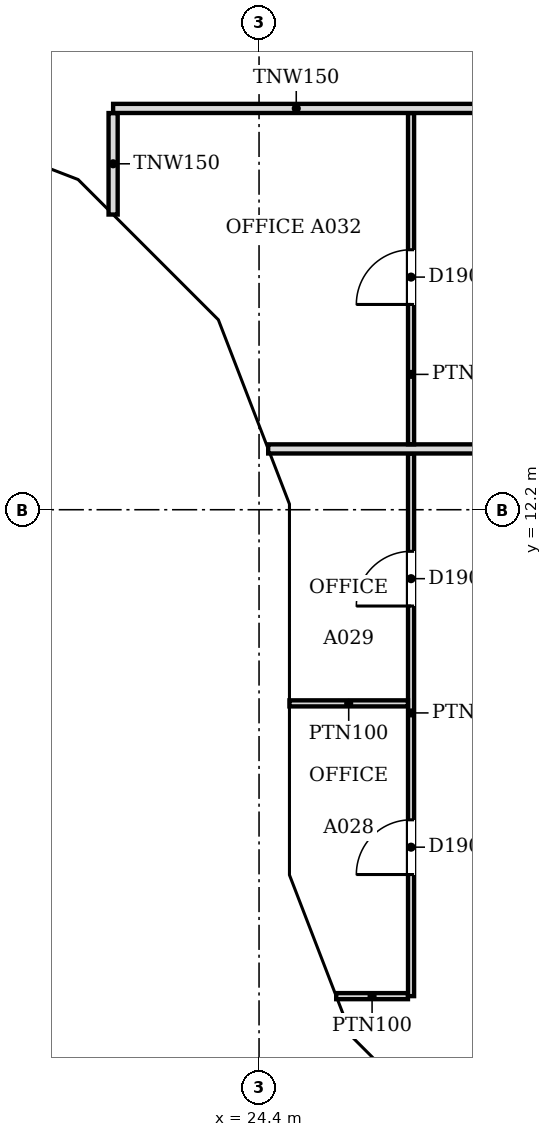
"""IFC4 building model, lengths in metres.
Left out: names, types, materials, properties, quantities, classifications, styles, units other than length and angle.
Written with IfcOpenShell. Run it as: python <this file> out.ifc"""

import sys

from ifc_helpers import new_model, si_unit, direction, frame, frame_2d, origin, place, context, subcontext, project, spatial, polyline, rectangle, outline, extrude, faceted_brep, source, transform, mapped, element, fill, save


model = new_model("IFC4")
c1 = context("Model", 3, precision=1e-05, world=origin(), true_north=direction((0.0, 1.0)))
c2 = subcontext(c1, "Body", "Model", "MODEL_VIEW")
j1 = project(units=[si_unit("LENGTHUNIT", "METRE"), si_unit("PLANEANGLEUNIT", "RADIAN")], contexts=[c1])
p1 = place(None, origin())
s1 = spatial("IfcSite", under=j1, at=p1, CompositionType="ELEMENT")
p2 = place(p1, origin())
s2 = spatial("IfcBuilding", under=s1, at=p2, CompositionType="ELEMENT")
p3 = place(p2, frame((0.0, 0.0, 155.4)))
s3 = spatial("IfcBuildingStorey", under=s2, at=p3, CompositionType="ELEMENT", Elevation=155.4)
m1 = source(origin(), c2, "Body", "Brep", [
    faceted_brep([(3.143, -0.25, 0.064), (0.093, -0.25, 3.744), (0.093, -0.25, 0.0), (3.143, -0.25, 0.0), (0.0, 0.25, 3.743), (0.047, 0.25, 3.8), (3.196, 0.25, 0.0), (0.0, 0.25, 0.0), (0.047, 0.0, 3.8), (3.196, -0.0, 0.0)], [[[0, 1, 2, 3]], [[4, 5, 6, 7]], [[6, 5, 8, 1, 0, 9]], [[5, 4, 8]], [[7, 6, 9, 3, 2]], [[7, 2, 1, 8, 4]], [[3, 9, 0]]]),
])
p4 = place(p3, frame((18.303, 18.567, 0.0), z_axis=(0.0, 0.0, 1.0), x_axis=(0.932978940178, -0.359930961693, 0.0)))
e1 = element("IfcWall", 1, at=p4, inside=s3, PredefinedType="SOLIDWALL", context=c2, shape_type="MappedRepresentation", body=[
    mapped(m1, transform((0.0, 0.0, 0.0), scale=1.0)),
])
m2 = source(origin(), c2, "Body", "SweptSolid", [
    extrude(outline(polyline([(2.664, 0.25), (0.247, 3.167), (0.247, 0.25), (2.664, 0.25)])), frame((0.0, 0.26, 0.0), z_axis=(0.0, -1.0, 0.0), x_axis=(1.0, 0.0, 0.0)), (0.0, 0.0, 1.0), 0.52),
])
p5 = place(p4, origin())
e2 = element("IfcOpeningElement", 2, at=p5, cuts=e1, PredefinedType="OPENING", context=c2, shape_type="MappedRepresentation", body=[
    mapped(m2, transform((0.0, 0.0, 0.0), scale=1.0)),
])
m3 = source(origin(), c2, "Body", "Brep", [
    faceted_brep([(3.103, -0.25, 3.736), (0.053, -0.25, 0.064), (0.053, -0.25, 0.0), (3.103, -0.25, 0.0), (0.0, 0.25, 0.0), (3.156, 0.25, 3.8), (3.209, 0.25, 3.736), (3.209, 0.25, 0.0), (3.156, -0.0, 3.8), (0.0, 0.0, 0.0)], [[[0, 1, 2, 3]], [[4, 5, 6, 7]], [[6, 5, 8]], [[5, 4, 9, 1, 0, 8]], [[4, 7, 3, 2, 9]], [[9, 2, 1]], [[3, 7, 6, 8, 0]]]),
])
p6 = place(p3, frame((21.285, 17.417, 0.0), z_axis=(0.0, 0.0, 1.0), x_axis=(0.707106781187, -0.707106781187, 0.0)))
e3 = element("IfcWall", 3, at=p6, inside=s3, PredefinedType="SOLIDWALL", context=c2, shape_type="MappedRepresentation", body=[
    mapped(m3, transform((0.0, 0.0, 0.0), scale=1.0)),
])
m4 = source(origin(), c2, "Body", "SweptSolid", [
    extrude(outline(polyline([(2.956, 3.168), (0.533, 0.25), (2.956, 0.25), (2.956, 3.168)])), frame((0.0, 0.26, 0.0), z_axis=(0.0, -1.0, 0.0), x_axis=(1.0, 0.0, 0.0)), (0.0, 0.0, 1.0), 0.52),
])
p7 = place(p6, origin())
e4 = element("IfcOpeningElement", 4, at=p7, cuts=e3, PredefinedType="OPENING", context=c2, shape_type="MappedRepresentation", body=[
    mapped(m4, transform((0.0, 0.0, 0.0), scale=1.0)),
])
m5 = source(origin(), c2, "Body", "Brep", [
    faceted_brep([(3.156, -0.25, 0.056), (0.106, -0.25, 3.736), (0.106, -0.25, 0.0), (3.156, -0.25, 0.0), (0.0, 0.25, 3.736), (0.053, 0.25, 3.8), (3.202, 0.25, 0.0), (0.0, 0.25, 0.0), (0.053, 0.0, 3.8), (3.202, -0.0, 0.0)], [[[0, 1, 2, 3]], [[4, 5, 6, 7]], [[6, 5, 8, 1, 0, 9]], [[5, 4, 8]], [[7, 6, 9, 3, 2]], [[7, 2, 1, 8, 4]], [[3, 9, 0]]]),
])
p8 = place(p3, frame((23.497, 15.234, 0.0), z_axis=(0.0, 0.0, 1.0), x_axis=(0.359913782069, -0.932985567668, 0.0)))
e5 = element("IfcWall", 5, at=p8, inside=s3, PredefinedType="SOLIDWALL", context=c2, shape_type="MappedRepresentation", body=[
    mapped(m5, transform((0.0, 0.0, 0.0), scale=1.0)),
])
m6 = source(origin(), c2, "Body", "SweptSolid", [
    extrude(outline(polyline([(2.671, 0.25), (0.253, 3.167), (0.253, 0.25), (2.671, 0.25)])), frame((0.0, 0.26, 0.0), z_axis=(0.0, -1.0, 0.0), x_axis=(1.0, 0.0, 0.0)), (0.0, 0.0, 1.0), 0.52),
])
p9 = place(p8, origin())
e6 = element("IfcOpeningElement", 6, at=p9, cuts=e5, PredefinedType="OPENING", context=c2, shape_type="MappedRepresentation", body=[
    mapped(m6, transform((0.0, 0.0, 0.0), scale=1.0)),
])
m7 = source(origin(), c2, "Body", "Brep", [
    faceted_brep([(6.1, -0.25, 0.0), (3.096, -0.25, 3.8), (0.047, -0.25, 0.057), (0.047, -0.25, 0.0), (0.0, 0.25, 0.0), (3.096, 0.25, 3.8), (6.053, 0.25, 0.059), (6.053, 0.25, 0.0), (6.1, -0.0, 0.0), (0.0, 0.0, 0.0)], [[[0, 1, 2, 3]], [[4, 5, 6, 7]], [[6, 5, 1, 0, 8]], [[5, 4, 9, 2, 1]], [[4, 7, 8, 0, 3, 9]], [[9, 3, 2]], [[8, 7, 6]]]),
])
p10 = place(p3, frame((24.65, 12.247, 0.0), z_axis=(0.0, 0.0, 1.0), x_axis=(0.0, -1.0, 0.0)))
e7 = element("IfcWall", 7, at=p10, inside=s3, PredefinedType="SOLIDWALL", context=c2, shape_type="MappedRepresentation", body=[
    mapped(m7, transform((0.0, 0.0, 0.0), scale=1.0)),
])
m8 = source(origin(), c2, "Body", "SweptSolid", [
    extrude(outline(polyline([(5.584, 0.25), (3.094, 3.401), (0.526, 0.25), (5.584, 0.25)])), frame((0.0, 0.26, 0.0), z_axis=(0.0, -1.0, 0.0), x_axis=(1.0, 0.0, 0.0)), (0.0, 0.0, 1.0), 0.52),
])
p11 = place(p10, origin())
e8 = element("IfcOpeningElement", 8, at=p11, cuts=e7, PredefinedType="OPENING", context=c2, shape_type="MappedRepresentation", body=[
    mapped(m8, transform((0.0, 0.0, 0.0), scale=1.0)),
])
m9 = source(origin(), c2, "Body", "Brep", [
    faceted_brep([(3.003, -0.25, 3.732), (2.95, -0.25, 3.8), (0.0, -0.25, 0.0), (3.003, -0.25, 0.0), (0.047, 0.25, 0.06), (2.898, 0.25, 3.732), (2.898, 0.25, 0.0), (0.047, 0.25, 0.0), (2.95, 0.0, 3.8), (0.0, 0.0, 0.0)], [[[0, 1, 2, 3]], [[4, 5, 6, 7]], [[8, 1, 0]], [[5, 4, 9, 2, 1, 8]], [[7, 6, 3, 2, 9]], [[7, 9, 4]], [[3, 6, 5, 8, 0]]]),
])
p12 = place(p3, frame((24.65, 6.146, 0.0), z_axis=(0.0, 0.0, 1.0), x_axis=(0.359953949349, -0.932970071518, 0.0)))
e9 = element("IfcWall", 9, at=p12, inside=s3, PredefinedType="SOLIDWALL", context=c2, shape_type="MappedRepresentation", body=[
    mapped(m9, transform((0.0, 0.0, 0.0), scale=1.0)),
])
m10 = source(origin(), c2, "Body", "SweptSolid", [
    extrude(outline(polyline([(2.75, 3.135), (0.511, 0.25), (2.75, 0.25), (2.75, 3.135)])), frame((0.0, 0.26, 0.0), z_axis=(0.0, -1.0, 0.0), x_axis=(1.0, 0.0, 0.0)), (0.0, 0.0, 1.0), 0.52),
])
p13 = place(p12, origin())
e10 = element("IfcOpeningElement", 10, at=p13, cuts=e9, PredefinedType="OPENING", context=c2, shape_type="MappedRepresentation", body=[
    mapped(m10, transform((0.0, 0.0, 0.0), scale=1.0)),
])
m11 = source(origin(), c2, "Body", "Brep", [
    faceted_brep([(2.997, -0.25, 0.0), (0.053, -0.25, 3.8), (0.0, -0.25, 3.732), (0.0, -0.25, 0.0), (0.106, 0.25, 3.732), (2.944, 0.25, 0.068), (2.944, 0.25, 0.0), (0.106, 0.25, 0.0), (0.053, 0.0, 3.8), (2.997, 0.0, 0.0)], [[[0, 1, 2, 3]], [[4, 5, 6, 7]], [[5, 4, 8, 1, 0, 9]], [[2, 1, 8]], [[7, 6, 9, 0, 3]], [[7, 3, 2, 8, 4]], [[9, 6, 5]]]),
])
p14 = place(p3, frame((25.675, 3.431, 0.0), z_axis=(0.0, 0.0, 1.0), x_axis=(0.707106781187, -0.707106781187, 0.0)))
e11 = element("IfcWall", 11, at=p14, inside=s3, PredefinedType="SOLIDWALL", context=c2, shape_type="MappedRepresentation", body=[
    mapped(m11, transform((0.0, 0.0, 0.0), scale=1.0)),
])
m12 = source(origin(), c2, "Body", "SweptSolid", [
    extrude(outline(polyline([(2.487, 0.25), (0.253, 3.134), (0.253, 0.25), (2.487, 0.25)])), frame((0.0, 0.26, 0.0), z_axis=(0.0, -1.0, 0.0), x_axis=(1.0, 0.0, 0.0)), (0.0, 0.0, 1.0), 0.52),
])
p15 = place(p14, origin())
e12 = element("IfcOpeningElement", 12, at=p15, cuts=e11, PredefinedType="OPENING", context=c2, shape_type="MappedRepresentation", body=[
    mapped(m12, transform((0.0, 0.0, 0.0), scale=1.0)),
])
p16 = place(p2, frame((0.0, 0.0, 159.2)))
s4 = spatial("IfcBuildingStorey", under=s2, at=p16, CompositionType="ELEMENT", Elevation=159.2)
m13 = source(origin(), c2, "Body", "Brep", [
    faceted_brep([(3.096, -0.25, 7.536), (0.047, -0.25, 3.856), (0.047, -0.25, 3.744), (3.096, -0.25, 0.064), (0.0, 0.25, 3.8), (3.149, 0.25, 7.6), (3.202, 0.25, 7.536), (3.202, 0.25, 0.064), (3.149, 0.25, 0.0), (3.149, -0.0, 0.0), (3.149, -0.0, 7.6), (0.0, 0.0, 3.8)], [[[0, 1, 2, 3]], [[4, 5, 6, 7, 8]], [[8, 7, 9]], [[6, 5, 10]], [[5, 4, 11, 1, 0, 10]], [[4, 8, 9, 3, 2, 11]], [[11, 2, 1]], [[3, 9, 7, 6, 10, 0]]]),
])
p17 = place(p16, frame((18.346, 18.55, -3.8), z_axis=(0.0, 0.0, 1.0), x_axis=(0.932985567668, -0.359913782069, 0.0)))
e13 = element("IfcWall", 13, at=p17, inside=s4, PredefinedType="SOLIDWALL", context=c2, shape_type="MappedRepresentation", body=[
    mapped(m13, transform((0.0, 0.0, 0.0), scale=1.0)),
])
m14 = source(origin(), c2, "Body", "SweptSolid", [
    extrude(outline(polyline([(2.949, 6.967), (0.325, 3.8), (2.949, 0.633), (2.949, 6.967)])), frame((0.0, 0.26, 0.0), z_axis=(0.0, -1.0, 0.0), x_axis=(1.0, 0.0, 0.0)), (0.0, 0.0, 1.0), 0.52),
])
p18 = place(p17, origin())
e14 = element("IfcOpeningElement", 14, at=p18, cuts=e13, PredefinedType="OPENING", context=c2, shape_type="MappedRepresentation", body=[
    mapped(m14, transform((0.0, 0.0, 0.0), scale=1.0)),
])
m15 = source(origin(), c2, "Body", "Brep", [
    faceted_brep([(0.106, -0.25, 0.064), (3.156, -0.25, 3.736), (3.156, -0.25, 3.864), (0.106, -0.25, 7.536), (0.0, 0.25, 7.536), (0.053, 0.25, 7.6), (3.209, 0.25, 3.8), (0.053, 0.25, 0.0), (0.0, 0.25, 0.064), (3.209, -0.0, 3.8), (0.053, 0.0, 0.0), (0.053, 0.0, 7.6)], [[[0, 1, 2, 3]], [[4, 5, 6, 7, 8]], [[7, 6, 9, 1, 0, 10]], [[6, 5, 11, 3, 2, 9]], [[5, 4, 11]], [[8, 7, 10]], [[8, 10, 0, 3, 11, 4]], [[1, 9, 2]]]),
])
p19 = place(p16, frame((21.248, 17.454, -3.8), z_axis=(0.0, 0.0, 1.0), x_axis=(0.707106781187, -0.707106781187, 0.0)))
e15 = element("IfcWall", 15, at=p19, inside=s4, PredefinedType="SOLIDWALL", context=c2, shape_type="MappedRepresentation", body=[
    mapped(m15, transform((0.0, 0.0, 0.0), scale=1.0)),
])
m16 = source(origin(), c2, "Body", "SweptSolid", [
    extrude(outline(polyline([(0.253, 0.632), (2.884, 3.8), (0.253, 6.968), (0.253, 0.632)])), frame((0.0, 0.26, 0.0), z_axis=(0.0, -1.0, 0.0), x_axis=(1.0, 0.0, 0.0)), (0.0, 0.0, 1.0), 0.52),
])
p20 = place(p19, origin())
e16 = element("IfcOpeningElement", 16, at=p20, cuts=e15, PredefinedType="OPENING", context=c2, shape_type="MappedRepresentation", body=[
    mapped(m16, transform((0.0, 0.0, 0.0), scale=1.0)),
])
m17 = source(origin(), c2, "Body", "Brep", [
    faceted_brep([(3.103, -0.25, 7.544), (0.053, -0.25, 3.864), (0.053, -0.25, 3.736), (3.103, -0.25, 0.056), (0.0, 0.25, 3.8), (3.149, 0.25, 7.6), (3.196, 0.25, 7.543), (3.196, 0.25, 0.057), (3.149, 0.25, 0.0), (3.149, -0.0, 0.0), (3.149, -0.0, 7.6), (0.0, 0.0, 3.8)], [[[0, 1, 2, 3]], [[4, 5, 6, 7, 8]], [[8, 7, 9]], [[6, 5, 10]], [[5, 4, 11, 1, 0, 10]], [[4, 8, 9, 3, 2, 11]], [[11, 2, 1]], [[3, 9, 7, 6, 10, 0]]]),
])
p21 = place(p16, frame((23.517, 15.185, -3.8), z_axis=(0.0, 0.0, 1.0), x_axis=(0.359864468756, -0.933004589553, 0.0)))
e17 = element("IfcWall", 17, at=p21, inside=s4, PredefinedType="SOLIDWALL", context=c2, shape_type="MappedRepresentation", body=[
    mapped(m17, transform((0.0, 0.0, 0.0), scale=1.0)),
])
p22 = place(p21, origin())
e18 = element("IfcOpeningElement", 18, at=p22, cuts=e17, PredefinedType="OPENING", context=c2, shape_type="MappedRepresentation", body=[
    mapped(m14, transform((0.0, 0.0, 0.0), scale=1.0)),
])
m18 = source(origin(), c2, "Body", "Brep", [
    faceted_brep([(0.093, -0.25, 0.057), (3.143, -0.25, 3.8), (0.093, -0.25, 7.543), (0.0, 0.25, 7.544), (0.047, 0.25, 7.6), (3.143, 0.25, 3.8), (0.047, 0.25, 0.0), (0.0, 0.25, 0.056), (0.047, 0.0, 0.0), (0.047, 0.0, 7.6)], [[[0, 1, 2]], [[3, 4, 5, 6, 7]], [[6, 5, 1, 0, 8]], [[5, 4, 9, 2, 1]], [[4, 3, 9]], [[7, 6, 8]], [[7, 8, 0, 2, 9, 3]]]),
])
p23 = place(p16, frame((24.65, 12.293, -3.8), z_axis=(0.0, 0.0, 1.0), x_axis=(0.0, -1.0, 0.0)))
e19 = element("IfcWall", 19, at=p23, inside=s4, PredefinedType="SOLIDWALL", context=c2, shape_type="MappedRepresentation", body=[
    mapped(m18, transform((0.0, 0.0, 0.0), scale=1.0)),
])
m19 = source(origin(), c2, "Body", "SweptSolid", [
    extrude(outline(polyline([(0.247, 0.641), (2.821, 3.8), (0.247, 6.959), (0.247, 0.641)])), frame((0.0, 0.26, 0.0), z_axis=(0.0, -1.0, 0.0), x_axis=(1.0, 0.0, 0.0)), (0.0, 0.0, 1.0), 0.52),
])
p24 = place(p23, origin())
e20 = element("IfcOpeningElement", 20, at=p24, cuts=e19, PredefinedType="OPENING", context=c2, shape_type="MappedRepresentation", body=[
    mapped(m19, transform((0.0, 0.0, 0.0), scale=1.0)),
])
m20 = source(origin(), c2, "Body", "Brep", [
    faceted_brep([(3.003, -0.25, 0.0), (3.05, -0.25, 0.06), (3.05, -0.25, 7.54), (3.003, -0.25, 7.6), (0.0, -0.25, 3.8), (0.0, 0.25, 3.8), (2.957, 0.25, 7.541), (2.957, 0.25, 0.059), (3.003, 0.0, 0.0), (3.003, 0.0, 7.6)], [[[0, 1, 2, 3, 4]], [[5, 6, 7]], [[1, 0, 8]], [[9, 3, 2]], [[6, 5, 4, 3, 9]], [[5, 7, 8, 0, 4]], [[1, 8, 7, 6, 9, 2]]]),
])
p25 = place(p16, frame((24.65, 9.15, -3.8), z_axis=(0.0, 0.0, 1.0), x_axis=(0.0, -1.0, 0.0)))
e21 = element("IfcWall", 21, at=p25, inside=s4, PredefinedType="SOLIDWALL", context=c2, shape_type="MappedRepresentation", body=[
    mapped(m20, transform((0.0, 0.0, 0.0), scale=1.0)),
])
m21 = source(origin(), c2, "Body", "SweptSolid", [
    extrude(outline(polyline([(2.803, 6.944), (0.319, 3.8), (2.803, 0.656), (2.803, 6.944)])), frame((0.0, 0.26, 0.0), z_axis=(0.0, -1.0, 0.0), x_axis=(1.0, 0.0, 0.0)), (0.0, 0.0, 1.0), 0.52),
])
p26 = place(p25, origin())
e22 = element("IfcOpeningElement", 22, at=p26, cuts=e21, PredefinedType="OPENING", context=c2, shape_type="MappedRepresentation", body=[
    mapped(m21, transform((0.0, 0.0, 0.0), scale=1.0)),
])
m22 = source(origin(), c2, "Body", "Brep", [
    faceted_brep([(0.047, -0.25, 0.0), (2.997, -0.25, 3.8), (0.047, -0.25, 7.6), (0.0, -0.25, 7.541), (0.0, -0.25, 0.059), (0.093, 0.25, 7.54), (2.944, 0.25, 3.868), (2.944, 0.25, 3.732), (0.093, 0.25, 0.06), (2.997, 0.0, 3.8), (0.047, 0.0, 0.0), (0.047, 0.0, 7.6)], [[[0, 1, 2, 3, 4]], [[5, 6, 7, 8]], [[8, 7, 9, 1, 0, 10]], [[6, 5, 11, 2, 1, 9]], [[3, 2, 11]], [[10, 0, 4]], [[8, 10, 4, 3, 11, 5]], [[9, 7, 6]]]),
])
p27 = place(p16, frame((24.633, 6.19, -3.8), z_axis=(0.0, 0.0, 1.0), x_axis=(0.359901446078, -0.932990326376, 0.0)))
e23 = element("IfcWall", 23, at=p27, inside=s4, PredefinedType="SOLIDWALL", context=c2, shape_type="MappedRepresentation", body=[
    mapped(m22, transform((0.0, 0.0, 0.0), scale=1.0)),
])
m23 = source(origin(), c2, "Body", "SweptSolid", [
    extrude(outline(polyline([(0.247, 0.665), (2.681, 3.8), (0.247, 6.935), (0.247, 0.665)])), frame((0.0, 0.26, 0.0), z_axis=(0.0, -1.0, 0.0), x_axis=(1.0, 0.0, 0.0)), (0.0, 0.0, 1.0), 0.52),
])
p28 = place(p27, origin())
e24 = element("IfcOpeningElement", 24, at=p28, cuts=e23, PredefinedType="OPENING", context=c2, shape_type="MappedRepresentation", body=[
    mapped(m23, transform((0.0, 0.0, 0.0), scale=1.0)),
])
m24 = source(origin(), c2, "Body", "Brep", [
    faceted_brep([(2.944, -0.25, 0.0), (2.997, -0.25, 0.068), (2.997, -0.25, 7.532), (2.944, -0.25, 7.6), (0.0, -0.25, 3.8), (0.053, 0.25, 3.868), (2.891, 0.25, 7.532), (2.891, 0.25, 0.068), (0.053, 0.25, 3.732), (2.944, 0.0, 0.0), (2.944, 0.0, 7.6), (0.0, 0.0, 3.8)], [[[0, 1, 2, 3, 4]], [[5, 6, 7, 8]], [[1, 0, 9]], [[10, 3, 2]], [[6, 5, 11, 4, 3, 10]], [[8, 7, 9, 0, 4, 11]], [[8, 11, 5]], [[1, 9, 7, 6, 10, 2]]]),
])
p29 = place(p16, frame((25.712, 3.394, -3.8), z_axis=(0.0, 0.0, 1.0), x_axis=(0.707066050402, -0.707147509625, 0.0)))
e25 = element("IfcWall", 25, at=p29, inside=s4, PredefinedType="SOLIDWALL", context=c2, shape_type="MappedRepresentation", body=[
    mapped(m24, transform((0.0, 0.0, 0.0), scale=1.0)),
])
m25 = source(origin(), c2, "Body", "SweptSolid", [
    extrude(outline(polyline([(2.744, 6.934), (0.316, 3.8), (2.744, 0.667), (2.744, 6.934)])), frame((0.0, 0.26, 0.0), z_axis=(0.0, -1.0, 0.0), x_axis=(1.0, 0.0, 0.0)), (0.0, 0.0, 1.0), 0.52),
])
p30 = place(p29, origin())
e26 = element("IfcOpeningElement", 26, at=p30, cuts=e25, PredefinedType="OPENING", context=c2, shape_type="MappedRepresentation", body=[
    mapped(m25, transform((0.0, 0.0, 0.0), scale=1.0)),
])
p31 = place(p3, frame((25.669, 4.2, 0.0), z_axis=(0.0, 0.0, 1.0), x_axis=(1.0, 0.0, 0.0)))
e27 = element("IfcWall", 27, at=p31, inside=s3, PredefinedType="PARTITIONING", context=c2, shape_type="SweptSolid", body=[
    extrude(rectangle(XDim=1.18, YDim=0.1, at=frame_2d((0.59, 0.0))), origin(), (0.0, 0.0, 1.0), 3.067),
])
p32 = place(p3, frame((26.9, 4.2, 0.0), z_axis=(0.0, 0.0, 1.0), x_axis=(0.0, 1.0, 0.0)))
e28 = element("IfcWall", 28, at=p32, inside=s3, PredefinedType="PARTITIONING", context=c2, shape_type="SweptSolid", body=[
    extrude(rectangle(XDim=8.924, YDim=0.1, at=frame_2d((4.462, 0.0))), origin(), (0.0, 0.0, 1.0), 3.067),
])
m26 = source(origin(), c2, "Body", "SweptSolid", [
    extrude(rectangle(XDim=0.9, YDim=2.1, at=frame_2d((0.45, 1.05))), frame((0.0, 0.06, 0.0), z_axis=(0.0, -1.0, 0.0), x_axis=(1.0, 0.0, 0.0)), (0.0, 0.0, 1.0), 0.12),
])
p33 = place(p32, frame((6.416, 0.0, 0.0)))
e29 = element("IfcOpeningElement", 29, at=p33, cuts=e28, PredefinedType="OPENING", context=c2, shape_type="MappedRepresentation", body=[
    mapped(m26, transform((0.0, 0.0, 0.0), scale=1.0)),
])
p34 = place(p32, frame((2.0, 0.0, 0.0)))
e30 = element("IfcOpeningElement", 30, at=p34, cuts=e28, PredefinedType="OPENING", context=c2, shape_type="MappedRepresentation", body=[
    mapped(m26, transform((0.0, 0.0, 0.0), scale=1.0)),
])
p35 = place(p3, frame((24.9, 9.015, 0.0), z_axis=(0.0, 0.0, 1.0), x_axis=(1.0, 0.0, 0.0)))
e31 = element("IfcWall", 31, at=p35, inside=s3, PredefinedType="PARTITIONING", context=c2, shape_type="SweptSolid", body=[
    extrude(rectangle(XDim=1.949, YDim=0.1, at=frame_2d((0.975, 0.0))), origin(), (0.0, 0.0, 1.0), 3.067),
])
p36 = place(p3, frame((24.55, 13.2, 0.0), z_axis=(0.0, 0.0, 1.0), x_axis=(1.0, 0.0, 0.0)))
e32 = element("IfcWall", 32, at=p36, inside=s3, PredefinedType="PARTITIONING", context=c2, shape_type="SweptSolid", body=[
    extrude(rectangle(XDim=15.249, YDim=0.15, at=frame_2d((7.625, 0.0))), origin(), (0.0, 0.0, 1.0), 3.067),
])
p37 = place(p3, frame((26.9, 13.276, 0.0), z_axis=(0.0, 0.0, 1.0), x_axis=(0.0, 1.0, 0.0)))
e33 = element("IfcWall", 33, at=p37, inside=s3, PredefinedType="PARTITIONING", context=c2, shape_type="SweptSolid", body=[
    extrude(rectangle(XDim=5.448, YDim=0.1, at=frame_2d((2.724, 0.0))), origin(), (0.0, 0.0, 1.0), 3.067),
])
p38 = place(p37, frame((2.3, 0.0, 0.0)))
e34 = element("IfcOpeningElement", 34, at=p38, cuts=e33, PredefinedType="OPENING", context=c2, shape_type="MappedRepresentation", body=[
    mapped(m26, transform((0.0, 0.0, 0.0), scale=1.0)),
])
p39 = place(p3, frame((22.0, 17.055, 0.0), z_axis=(0.0, 0.0, 1.0), x_axis=(0.0, 1.0, 0.0)))
e35 = element("IfcWall", 35, at=p39, inside=s3, PredefinedType="PARTITIONING", context=c2, shape_type="SweptSolid", body=[
    extrude(rectangle(XDim=1.669, YDim=0.15, at=frame_2d((0.834, 0.0))), origin(), (0.0, 0.0, 1.0), 3.067),
])
p40 = place(p3, frame((22.0, 18.8, 0.0), z_axis=(0.0, 0.0, 1.0), x_axis=(1.0, 0.0, 0.0)))
e36 = element("IfcWall", 36, at=p40, inside=s3, PredefinedType="PARTITIONING", context=c2, shape_type="SweptSolid", body=[
    extrude(rectangle(XDim=6.024, YDim=0.15, at=frame_2d((3.012, 0.0))), origin(), (0.0, 0.0, 1.0), 3.067),
])
m27 = source(origin(), c2, "Body", "SweptSolid", [
    extrude(rectangle(XDim=0.9, YDim=2.1, at=frame_2d((0.45, 1.05))), frame((0.0, 0.025, 0.0), z_axis=(0.0, -1.0, 0.0), x_axis=(1.0, 0.0, 0.0)), (0.0, 0.0, 1.0), 0.05),
])
p41 = place(p33, origin())
e37 = element("IfcDoor", 37, at=p41, inside=s3, OperationType="SINGLE_SWING_LEFT", PredefinedType="DOOR", context=c2, shape_type="MappedRepresentation", body=[
    mapped(m27, transform((0.0, 0.0, 0.0), scale=1.0)),
])
fill(e29, e37)
p42 = place(p38, origin())
e38 = element("IfcDoor", 38, at=p42, inside=s3, OperationType="SINGLE_SWING_LEFT", PredefinedType="DOOR", context=c2, shape_type="MappedRepresentation", body=[
    mapped(m27, transform((0.0, 0.0, 0.0), scale=1.0)),
])
fill(e34, e38)
p43 = place(p34, origin())
e39 = element("IfcDoor", 39, at=p43, inside=s3, OperationType="SINGLE_SWING_LEFT", PredefinedType="DOOR", context=c2, shape_type="MappedRepresentation", body=[
    mapped(m27, transform((0.0, 0.0, 0.0), scale=1.0)),
])
fill(e30, e39)
save(model, sys.argv[1])
